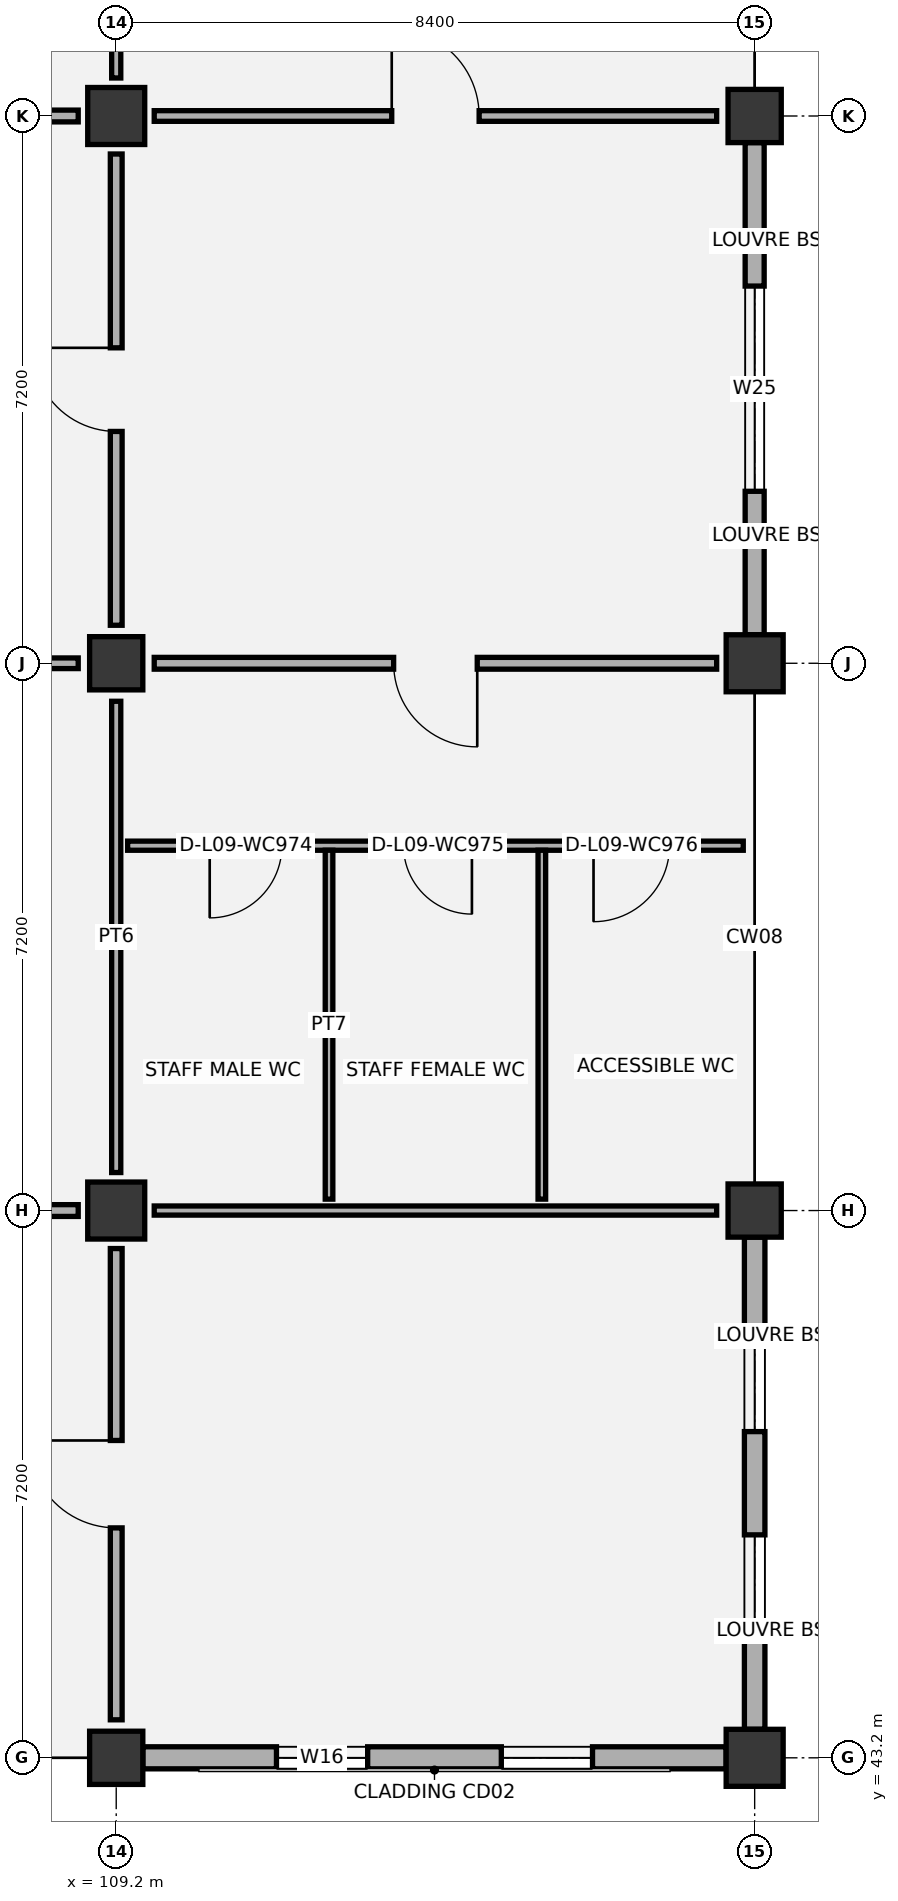
"""IFC4 building model, lengths in metres.
Left out: names, types, materials, properties, quantities, classifications, styles, units other than length and angle.
Written with IfcOpenShell. Run it as: python <this file> out.ifc"""

import sys

from ifc_helpers import new_model, si_unit, direction, frame, frame_2d, origin, origin_2d, place, context, subcontext, project, spatial, rectangle, extrude, element, fill, save


model = new_model("IFC4")
c1 = context("Model", 3, precision=1e-05, world=origin(), true_north=direction((0.0, 1.0)))
c2 = subcontext(c1, "Body", "Model", "MODEL_VIEW")
j1 = project(units=[si_unit("LENGTHUNIT", "METRE"), si_unit("PLANEANGLEUNIT", "RADIAN")], contexts=[c1])
p1 = place(None, origin())
s1 = spatial("IfcSite", under=j1, at=p1, CompositionType="ELEMENT")
p2 = place(p1, origin())
s2 = spatial("IfcBuilding", under=s1, at=p2, CompositionType="ELEMENT")
p3 = place(p2, frame((0.0, 0.0, 43.8)))
s3 = spatial("IfcBuildingStorey", under=s2, at=p3, CompositionType="ELEMENT", Elevation=43.8)
p4 = place(p3, frame((109.2, 43.2, 0.0), z_axis=(0.0, 0.0, 1.0), x_axis=(1.0, 0.0, 0.0)))
e1 = element("IfcColumn", 1, at=p4, inside=s3, PredefinedType="COLUMN", context=c2, shape_type="SweptSolid", body=[
    extrude(rectangle(XDim=0.7, YDim=0.7, at=origin_2d()), origin(), (0.0, 0.0, 1.0), 4.2),
])
p5 = place(p3, frame((109.2, 50.4, 0.0), z_axis=(0.0, 0.0, 1.0), x_axis=(1.0, 0.0, 0.0)))
e2 = element("IfcColumn", 2, at=p5, inside=s3, PredefinedType="COLUMN", context=c2, shape_type="SweptSolid", body=[
    extrude(rectangle(XDim=0.75, YDim=0.75, at=origin_2d()), origin(), (0.0, 0.0, 1.0), 4.2),
])
p6 = place(p3, frame((109.2, 57.6, 0.0), z_axis=(0.0, 0.0, 1.0), x_axis=(1.0, 0.0, 0.0)))
e3 = element("IfcColumn", 3, at=p6, inside=s3, PredefinedType="COLUMN", context=c2, shape_type="SweptSolid", body=[
    extrude(rectangle(XDim=0.7, YDim=0.7, at=origin_2d()), origin(), (0.0, 0.0, 1.0), 4.2),
])
for number, where, z_axis, x_axis in (
    (4, (109.2, 64.8, 0.0), (0.0, 0.0, 1.0), (1.0, 0.0, 0.0)),
    (5, (117.6, 43.2, 0.0), (0.0, 0.0, 1.0), (1.0, 0.0, 0.0)),
):
    element("IfcColumn", number, at=place(p3, frame(where, z_axis=z_axis, x_axis=x_axis)), inside=s3, PredefinedType="COLUMN", context=c2, shape_type="SweptSolid", body=[
        extrude(rectangle(XDim=0.75, YDim=0.75, at=origin_2d()), origin(), (0.0, 0.0, 1.0), 4.2),
    ])
p7 = place(p3, frame((117.6, 50.4, 0.0), z_axis=(0.0, 0.0, 1.0), x_axis=(1.0, 0.0, 0.0)))
e6 = element("IfcColumn", 6, at=p7, inside=s3, PredefinedType="COLUMN", context=c2, shape_type="SweptSolid", body=[
    extrude(rectangle(XDim=0.7, YDim=0.7, at=origin_2d()), origin(), (0.0, 0.0, 1.0), 4.2),
])
p8 = place(p3, frame((117.6, 57.6, 0.0), z_axis=(0.0, 0.0, 1.0), x_axis=(1.0, 0.0, 0.0)))
e7 = element("IfcColumn", 7, at=p8, inside=s3, PredefinedType="COLUMN", context=c2, shape_type="SweptSolid", body=[
    extrude(rectangle(XDim=0.75, YDim=0.75, at=origin_2d()), origin(), (0.0, 0.0, 1.0), 4.2),
])
p9 = place(p3, frame((117.6, 64.8, 0.0), z_axis=(0.0, 0.0, 1.0), x_axis=(1.0, 0.0, 0.0)))
e8 = element("IfcColumn", 8, at=p9, inside=s3, PredefinedType="COLUMN", context=c2, shape_type="SweptSolid", body=[
    extrude(rectangle(XDim=0.7, YDim=0.7, at=origin_2d()), origin(), (0.0, 0.0, 1.0), 4.2),
])
p10 = place(p3, frame((109.55, 43.2, 0.0), z_axis=(0.0, 0.0, 1.0), x_axis=(1.0, 0.0, 0.0)))
e9 = element("IfcWall", 9, at=p10, inside=s3, PredefinedType="SOLIDWALL", context=c2, shape_type="SweptSolid", body=[
    extrude(rectangle(XDim=7.675, YDim=0.29, at=frame_2d((3.837, 0.0))), origin(), (0.0, 0.0, 1.0), 3.345),
])
p11 = place(p10, frame((1.758, 0.0, 0.95)))
e10 = element("IfcOpeningElement", 10, at=p11, cuts=e9, PredefinedType="OPENING", context=c2, shape_type="SweptSolid", body=[
    extrude(rectangle(XDim=1.2, YDim=1.5, at=frame_2d((0.6, 0.75))), frame((0.0, 0.155, 0.0), z_axis=(0.0, -1.0, 0.0), x_axis=(1.0, 0.0, 0.0)), (0.0, 0.0, 1.0), 0.31),
])
p12 = place(p10, frame((4.717, 0.0, 0.95)))
e11 = element("IfcOpeningElement", 11, at=p12, cuts=e9, PredefinedType="OPENING", context=c2, shape_type="SweptSolid", body=[
    extrude(rectangle(XDim=1.2, YDim=1.5, at=frame_2d((0.6, 0.75))), frame((0.0, 0.155, 0.0), z_axis=(0.0, -1.0, 0.0), x_axis=(1.0, 0.0, 0.0)), (0.0, 0.0, 1.0), 0.31),
])
p13 = place(p3, frame((117.6, 43.575, 0.0), z_axis=(0.0, 0.0, 1.0), x_axis=(0.0, 1.0, 0.0)))
e12 = element("IfcWall", 12, at=p13, inside=s3, PredefinedType="SOLIDWALL", context=c2, shape_type="SweptSolid", body=[
    extrude(rectangle(XDim=6.475, YDim=0.27, at=frame_2d((3.238, 0.0))), origin(), (0.0, 0.0, 1.0), 3.345),
])
p14 = place(p13, frame((1.358, 0.0, 0.95)))
e13 = element("IfcOpeningElement", 13, at=p14, cuts=e12, PredefinedType="OPENING", context=c2, shape_type="SweptSolid", body=[
    extrude(rectangle(XDim=1.2, YDim=1.5, at=frame_2d((0.6, 0.75))), frame((0.0, 0.145, 0.0), z_axis=(0.0, -1.0, 0.0), x_axis=(1.0, 0.0, 0.0)), (0.0, 0.0, 1.0), 0.29),
])
p15 = place(p13, frame((3.917, 0.0, 0.95)))
e14 = element("IfcOpeningElement", 14, at=p15, cuts=e12, PredefinedType="OPENING", context=c2, shape_type="SweptSolid", body=[
    extrude(rectangle(XDim=1.2, YDim=1.5, at=frame_2d((0.6, 0.75))), frame((0.0, 0.145, 0.0), z_axis=(0.0, -1.0, 0.0), x_axis=(1.0, 0.0, 0.0)), (0.0, 0.0, 1.0), 0.29),
])
p16 = place(p3, frame((117.6, 57.975, 0.0), z_axis=(0.0, 0.0, 1.0), x_axis=(0.0, 1.0, 0.0)))
e15 = element("IfcWall", 15, at=p16, inside=s3, PredefinedType="SOLIDWALL", context=c2, shape_type="SweptSolid", body=[
    extrude(rectangle(XDim=6.475, YDim=0.25, at=frame_2d((3.237, 0.0))), origin(), (0.0, 0.0, 1.0), 3.345),
])
p17 = place(p16, frame((1.887, 0.0, 0.95)))
e16 = element("IfcOpeningElement", 16, at=p17, cuts=e15, PredefinedType="OPENING", context=c2, shape_type="SweptSolid", body=[
    extrude(rectangle(XDim=2.7, YDim=1.65, at=frame_2d((1.35, 0.825))), frame((0.0, 0.135, 0.0), z_axis=(0.0, -1.0, 0.0), x_axis=(1.0, 0.0, 0.0)), (0.0, 0.0, 1.0), 0.27),
])
p18 = place(p3, frame((109.35, 55.2, 0.0), z_axis=(0.0, 0.0, 1.0), x_axis=(1.0, 0.0, 0.0)))
e17 = element("IfcWall", 17, at=p18, inside=s3, PredefinedType="PARTITIONING", context=c2, shape_type="SweptSolid", body=[
    extrude(rectangle(XDim=8.1, YDim=0.12, at=frame_2d((4.05, 0.0))), origin(), (0.0, 0.0, 1.0), 3.9),
])
p19 = place(p18, frame((1.08, 0.0, 0.0)))
e18 = element("IfcOpeningElement", 18, at=p19, cuts=e17, PredefinedType="OPENING", context=c2, shape_type="SweptSolid", body=[
    extrude(rectangle(XDim=0.95, YDim=2.1, at=frame_2d((0.475, 1.05))), frame((0.0, 0.07, 0.0), z_axis=(0.0, -1.0, 0.0), x_axis=(1.0, 0.0, 0.0)), (0.0, 0.0, 1.0), 0.14),
])
p20 = place(p18, frame((3.63, 0.0, 0.0)))
e19 = element("IfcOpeningElement", 19, at=p20, cuts=e17, PredefinedType="OPENING", context=c2, shape_type="SweptSolid", body=[
    extrude(rectangle(XDim=0.9, YDim=2.1, at=frame_2d((0.45, 1.05))), frame((0.0, 0.07, 0.0), z_axis=(0.0, -1.0, 0.0), x_axis=(1.0, 0.0, 0.0)), (0.0, 0.0, 1.0), 0.14),
])
p21 = place(p18, frame((6.13, 0.0, 0.0)))
e20 = element("IfcOpeningElement", 20, at=p21, cuts=e17, PredefinedType="OPENING", context=c2, shape_type="SweptSolid", body=[
    extrude(rectangle(XDim=1.0, YDim=2.1, at=frame_2d((0.5, 1.05))), frame((0.0, 0.07, 0.0), z_axis=(0.0, -1.0, 0.0), x_axis=(1.0, 0.0, 0.0)), (0.0, 0.0, 1.0), 0.14),
])
for number, where, z_axis, x_axis in (
    (21, (112.0, 50.55, 0.0), (0.0, 0.0, 1.0), (0.0, 1.0, 0.0)),
    (22, (114.8, 50.55, 0.0), (0.0, 0.0, 1.0), (0.0, 1.0, 0.0)),
):
    element("IfcWall", number, at=place(p3, frame(where, z_axis=z_axis, x_axis=x_axis)), inside=s3, PredefinedType="PARTITIONING", context=c2, shape_type="SweptSolid", body=[
        extrude(rectangle(XDim=4.59, YDim=0.1, at=frame_2d((2.295, 0.0))), origin(), (0.0, 0.0, 1.0), 3.9),
    ])
p22 = place(p3, frame((109.2, 43.7, 0.0), z_axis=(0.0, 0.0, 1.0), x_axis=(0.0, 1.0, 0.0)))
e23 = element("IfcWall", 23, at=p22, inside=s3, PredefinedType="PARTITIONING", context=c2, shape_type="SweptSolid", body=[
    extrude(rectangle(XDim=6.2, YDim=0.155, at=frame_2d((3.1, 0.0))), origin(), (0.0, 0.0, 1.0), 3.395),
])
p23 = place(p22, frame((2.525, 0.0, 0.0)))
e24 = element("IfcOpeningElement", 24, at=p23, cuts=e23, PredefinedType="OPENING", context=c2, shape_type="SweptSolid", body=[
    extrude(rectangle(XDim=1.15, YDim=2.1, at=frame_2d((0.575, 1.05))), frame((0.0, 0.087, 0.0), z_axis=(0.0, -1.0, 0.0), x_axis=(1.0, 0.0, 0.0)), (0.0, 0.0, 1.0), 0.175),
])
p24 = place(p3, frame((101.3, 50.4, 0.0), z_axis=(0.0, 0.0, 1.0), x_axis=(1.0, 0.0, 0.0)))
e25 = element("IfcWall", 25, at=p24, inside=s3, PredefinedType="PARTITIONING", context=c2, shape_type="SweptSolid", body=[
    extrude(rectangle(XDim=7.4, YDim=0.155, at=frame_2d((3.7, 0.0))), origin(), (0.0, 0.0, 1.0), 3.445),
])
p25 = place(p24, frame((3.15, 0.0, 0.0)))
e26 = element("IfcOpeningElement", 26, at=p25, cuts=e25, PredefinedType="OPENING", context=c2, shape_type="SweptSolid", body=[
    extrude(rectangle(XDim=1.1, YDim=2.1, at=frame_2d((0.55, 1.05))), frame((0.0, 0.087, 0.0), z_axis=(0.0, -1.0, 0.0), x_axis=(1.0, 0.0, 0.0)), (0.0, 0.0, 1.0), 0.175),
])
p26 = place(p3, frame((109.2, 50.9, 0.0), z_axis=(0.0, 0.0, 1.0), x_axis=(0.0, 1.0, 0.0)))
e27 = element("IfcWall", 27, at=p26, inside=s3, PredefinedType="PARTITIONING", context=c2, shape_type="SweptSolid", body=[
    extrude(rectangle(XDim=6.2, YDim=0.12, at=frame_2d((3.1, 0.0))), origin(), (0.0, 0.0, 1.0), 3.345),
])
p27 = place(p3, frame((101.3, 57.6, 0.0), z_axis=(0.0, 0.0, 1.0), x_axis=(1.0, 0.0, 0.0)))
e28 = element("IfcWall", 28, at=p27, inside=s3, PredefinedType="PARTITIONING", context=c2, shape_type="SweptSolid", body=[
    extrude(rectangle(XDim=7.4, YDim=0.14, at=frame_2d((3.7, 0.0))), origin(), (0.0, 0.0, 1.0), 3.445),
])
p28 = place(p27, frame((3.125, 0.0, 0.0)))
e29 = element("IfcOpeningElement", 29, at=p28, cuts=e28, PredefinedType="OPENING", context=c2, shape_type="SweptSolid", body=[
    extrude(rectangle(XDim=1.15, YDim=2.1, at=frame_2d((0.575, 1.05))), frame((0.0, 0.08, 0.0), z_axis=(0.0, -1.0, 0.0), x_axis=(1.0, 0.0, 0.0)), (0.0, 0.0, 1.0), 0.16),
])
p29 = place(p3, frame((109.2, 58.1, 0.0), z_axis=(0.0, 0.0, 1.0), x_axis=(0.0, 1.0, 0.0)))
e30 = element("IfcWall", 30, at=p29, inside=s3, PredefinedType="PARTITIONING", context=c2, shape_type="SweptSolid", body=[
    extrude(rectangle(XDim=6.2, YDim=0.155, at=frame_2d((3.1, 0.0))), origin(), (0.0, 0.0, 1.0), 3.495),
])
p30 = place(p29, frame((2.55, 0.0, 0.0)))
e31 = element("IfcOpeningElement", 31, at=p30, cuts=e30, PredefinedType="OPENING", context=c2, shape_type="SweptSolid", body=[
    extrude(rectangle(XDim=1.1, YDim=2.1, at=frame_2d((0.55, 1.05))), frame((0.0, 0.087, 0.0), z_axis=(0.0, -1.0, 0.0), x_axis=(1.0, 0.0, 0.0)), (0.0, 0.0, 1.0), 0.175),
])
p31 = place(p3, frame((101.3, 64.8, 0.0), z_axis=(0.0, 0.0, 1.0), x_axis=(1.0, 0.0, 0.0)))
e32 = element("IfcWall", 32, at=p31, inside=s3, PredefinedType="PARTITIONING", context=c2, shape_type="SweptSolid", body=[
    extrude(rectangle(XDim=7.4, YDim=0.155, at=frame_2d((3.7, 0.0))), origin(), (0.0, 0.0, 1.0), 3.445),
])
p32 = place(p31, frame((3.125, 0.0, 0.0)))
e33 = element("IfcOpeningElement", 33, at=p32, cuts=e32, PredefinedType="OPENING", context=c2, shape_type="SweptSolid", body=[
    extrude(rectangle(XDim=1.15, YDim=2.1, at=frame_2d((0.575, 1.05))), frame((0.0, 0.087, 0.0), z_axis=(0.0, -1.0, 0.0), x_axis=(1.0, 0.0, 0.0)), (0.0, 0.0, 1.0), 0.175),
])
p33 = place(p3, frame((109.2, 65.3, 0.0), z_axis=(0.0, 0.0, 1.0), x_axis=(0.0, 1.0, 0.0)))
e34 = element("IfcWall", 34, at=p33, inside=s3, PredefinedType="PARTITIONING", context=c2, shape_type="SweptSolid", body=[
    extrude(rectangle(XDim=6.2, YDim=0.12, at=frame_2d((3.1, 0.0))), origin(), (0.0, 0.0, 1.0), 3.345),
])
p34 = place(p3, frame((109.7, 50.4, 0.0), z_axis=(0.0, 0.0, 1.0), x_axis=(1.0, 0.0, 0.0)))
e35 = element("IfcWall", 35, at=p34, inside=s3, PredefinedType="PARTITIONING", context=c2, shape_type="SweptSolid", body=[
    extrude(rectangle(XDim=7.4, YDim=0.12, at=frame_2d((3.7, 0.0))), origin(), (0.0, 0.0, 1.0), 3.295),
])
p35 = place(p3, frame((109.7, 57.6, 0.0), z_axis=(0.0, 0.0, 1.0), x_axis=(1.0, 0.0, 0.0)))
e36 = element("IfcWall", 36, at=p35, inside=s3, PredefinedType="PARTITIONING", context=c2, shape_type="SweptSolid", body=[
    extrude(rectangle(XDim=7.4, YDim=0.155, at=frame_2d((3.7, 0.0))), origin(), (0.0, 0.0, 1.0), 3.295),
])
p36 = place(p35, frame((3.15, 0.0, 0.0)))
e37 = element("IfcOpeningElement", 37, at=p36, cuts=e36, PredefinedType="OPENING", context=c2, shape_type="SweptSolid", body=[
    extrude(rectangle(XDim=1.1, YDim=2.1, at=frame_2d((0.55, 1.05))), frame((0.0, 0.087, 0.0), z_axis=(0.0, -1.0, 0.0), x_axis=(1.0, 0.0, 0.0)), (0.0, 0.0, 1.0), 0.175),
])
p37 = place(p3, frame((109.7, 64.8, 0.0), z_axis=(0.0, 0.0, 1.0), x_axis=(1.0, 0.0, 0.0)))
e38 = element("IfcWall", 38, at=p37, inside=s3, PredefinedType="PARTITIONING", context=c2, shape_type="SweptSolid", body=[
    extrude(rectangle(XDim=7.4, YDim=0.14, at=frame_2d((3.7, 0.0))), origin(), (0.0, 0.0, 1.0), 3.295),
])
p38 = place(p37, frame((3.125, 0.0, 0.0)))
e39 = element("IfcOpeningElement", 39, at=p38, cuts=e38, PredefinedType="OPENING", context=c2, shape_type="SweptSolid", body=[
    extrude(rectangle(XDim=1.15, YDim=2.1, at=frame_2d((0.575, 1.05))), frame((0.0, 0.08, 0.0), z_axis=(0.0, -1.0, 0.0), x_axis=(1.0, 0.0, 0.0)), (0.0, 0.0, 1.0), 0.16),
])
p39 = place(p11, origin())
e40 = element("IfcWindow", 40, at=p39, inside=s3, PartitioningType="SINGLE_PANEL", PredefinedType="WINDOW", context=c2, shape_type="SweptSolid", body=[
    extrude(rectangle(XDim=1.2, YDim=1.5, at=frame_2d((0.6, 0.75))), frame((0.0, 0.03, 0.0), z_axis=(0.0, -1.0, 0.0), x_axis=(1.0, 0.0, 0.0)), (0.0, 0.0, 1.0), 0.06),
])
fill(e10, e40)
p40 = place(p12, origin())
e41 = element("IfcWindow", 41, at=p40, inside=s3, PartitioningType="SINGLE_PANEL", PredefinedType="WINDOW", context=c2, shape_type="SweptSolid", body=[
    extrude(rectangle(XDim=1.2, YDim=1.5, at=frame_2d((0.6, 0.75))), frame((0.0, 0.03, 0.0), z_axis=(0.0, -1.0, 0.0), x_axis=(1.0, 0.0, 0.0)), (0.0, 0.0, 1.0), 0.06),
])
fill(e11, e41)
p41 = place(p14, origin())
e42 = element("IfcWindow", 42, at=p41, inside=s3, PartitioningType="SINGLE_PANEL", PredefinedType="WINDOW", context=c2, shape_type="SweptSolid", body=[
    extrude(rectangle(XDim=1.2, YDim=1.5, at=frame_2d((0.6, 0.75))), frame((0.0, 0.03, 0.0), z_axis=(0.0, -1.0, 0.0), x_axis=(1.0, 0.0, 0.0)), (0.0, 0.0, 1.0), 0.06),
])
fill(e13, e42)
p42 = place(p15, origin())
e43 = element("IfcWindow", 43, at=p42, inside=s3, PartitioningType="SINGLE_PANEL", PredefinedType="WINDOW", context=c2, shape_type="SweptSolid", body=[
    extrude(rectangle(XDim=1.2, YDim=1.5, at=frame_2d((0.6, 0.75))), frame((0.0, 0.03, 0.0), z_axis=(0.0, -1.0, 0.0), x_axis=(1.0, 0.0, 0.0)), (0.0, 0.0, 1.0), 0.06),
])
fill(e14, e43)
p43 = place(p17, origin())
e44 = element("IfcWindow", 44, at=p43, inside=s3, PartitioningType="SINGLE_PANEL", PredefinedType="WINDOW", context=c2, shape_type="SweptSolid", body=[
    extrude(rectangle(XDim=2.7, YDim=1.65, at=frame_2d((1.35, 0.825))), frame((0.0, 0.03, 0.0), z_axis=(0.0, -1.0, 0.0), x_axis=(1.0, 0.0, 0.0)), (0.0, 0.0, 1.0), 0.06),
])
fill(e16, e44)
p44 = place(p19, frame((0.95, 0.0, 0.0), z_axis=(0.0, 0.0, 1.0), x_axis=(-1.0, 0.0, 0.0)))
e45 = element("IfcDoor", 45, at=p44, inside=s3, OperationType="SINGLE_SWING_RIGHT", PredefinedType="DOOR", context=c2, shape_type="SweptSolid", body=[
    extrude(rectangle(XDim=0.95, YDim=2.1, at=frame_2d((0.475, 1.05))), frame((0.0, 0.025, 0.0), z_axis=(0.0, -1.0, 0.0), x_axis=(1.0, 0.0, 0.0)), (0.0, 0.0, 1.0), 0.05),
])
fill(e18, e45)
p45 = place(p20, frame((0.9, 0.0, 0.0), z_axis=(0.0, 0.0, 1.0), x_axis=(-1.0, 0.0, 0.0)))
e46 = element("IfcDoor", 46, at=p45, inside=s3, OperationType="SINGLE_SWING_LEFT", PredefinedType="DOOR", context=c2, shape_type="SweptSolid", body=[
    extrude(rectangle(XDim=0.9, YDim=2.1, at=frame_2d((0.45, 1.05))), frame((0.0, 0.025, 0.0), z_axis=(0.0, -1.0, 0.0), x_axis=(1.0, 0.0, 0.0)), (0.0, 0.0, 1.0), 0.05),
])
fill(e19, e46)
p46 = place(p21, frame((1.0, 0.0, 0.0), z_axis=(0.0, 0.0, 1.0), x_axis=(-1.0, 0.0, 0.0)))
e47 = element("IfcDoor", 47, at=p46, inside=s3, OperationType="SINGLE_SWING_RIGHT", PredefinedType="DOOR", context=c2, shape_type="SweptSolid", body=[
    extrude(rectangle(XDim=1.0, YDim=2.1, at=frame_2d((0.5, 1.05))), frame((0.0, 0.025, 0.0), z_axis=(0.0, -1.0, 0.0), x_axis=(1.0, 0.0, 0.0)), (0.0, 0.0, 1.0), 0.05),
])
fill(e20, e47)
p47 = place(p23, origin())
e48 = element("IfcDoor", 48, at=p47, inside=s3, OperationType="SINGLE_SWING_RIGHT", PredefinedType="DOOR", context=c2, shape_type="SweptSolid", body=[
    extrude(rectangle(XDim=1.15, YDim=2.1, at=frame_2d((0.575, 1.05))), frame((0.0, 0.025, 0.0), z_axis=(0.0, -1.0, 0.0), x_axis=(1.0, 0.0, 0.0)), (0.0, 0.0, 1.0), 0.05),
])
fill(e24, e48)
p48 = place(p30, origin())
e49 = element("IfcDoor", 49, at=p48, inside=s3, OperationType="SINGLE_SWING_RIGHT", PredefinedType="DOOR", context=c2, shape_type="SweptSolid", body=[
    extrude(rectangle(XDim=1.1, YDim=2.1, at=frame_2d((0.55, 1.05))), frame((0.0, 0.025, 0.0), z_axis=(0.0, -1.0, 0.0), x_axis=(1.0, 0.0, 0.0)), (0.0, 0.0, 1.0), 0.05),
])
fill(e31, e49)
p49 = place(p36, frame((1.1, 0.0, 0.0), z_axis=(0.0, 0.0, 1.0), x_axis=(-1.0, 0.0, 0.0)))
e50 = element("IfcDoor", 50, at=p49, inside=s3, OperationType="SINGLE_SWING_LEFT", PredefinedType="DOOR", context=c2, shape_type="SweptSolid", body=[
    extrude(rectangle(XDim=1.1, YDim=2.1, at=frame_2d((0.55, 1.05))), frame((0.0, 0.025, 0.0), z_axis=(0.0, -1.0, 0.0), x_axis=(1.0, 0.0, 0.0)), (0.0, 0.0, 1.0), 0.05),
])
fill(e37, e50)
p50 = place(p38, origin())
e51 = element("IfcDoor", 51, at=p50, inside=s3, OperationType="SINGLE_SWING_LEFT", PredefinedType="DOOR", context=c2, shape_type="SweptSolid", body=[
    extrude(rectangle(XDim=1.15, YDim=2.1, at=frame_2d((0.575, 1.05))), frame((0.0, 0.025, 0.0), z_axis=(0.0, -1.0, 0.0), x_axis=(1.0, 0.0, 0.0)), (0.0, 0.0, 1.0), 0.05),
])
fill(e39, e51)
save(model, sys.argv[1])
